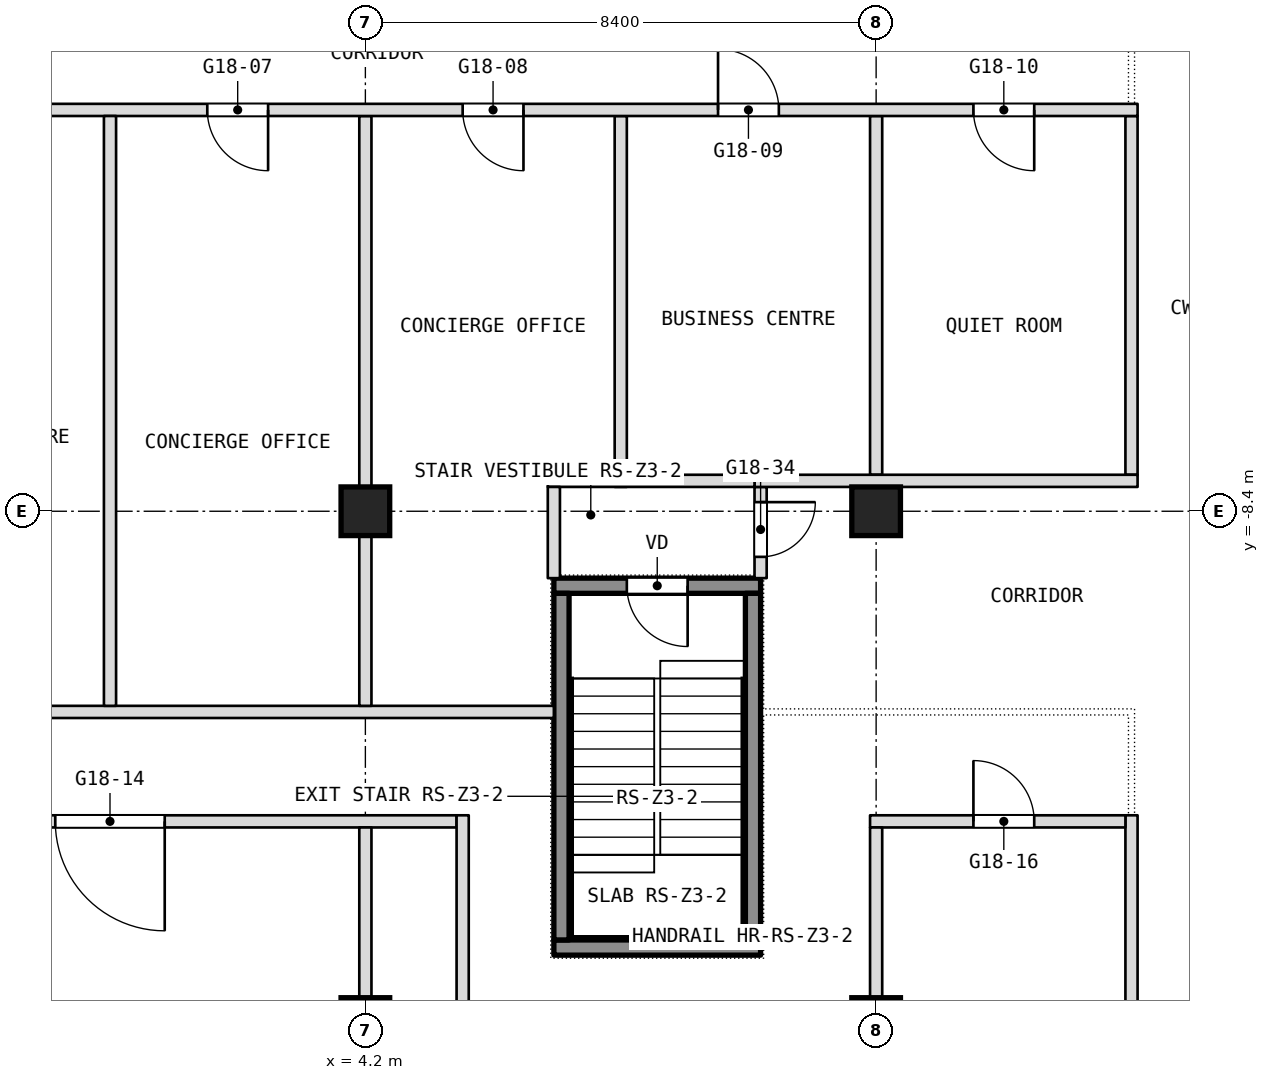
"""IFC4 building model, lengths in metres.
Left out: names, types, materials, properties, quantities, classifications, styles, units other than length and angle.
Written with IfcOpenShell. Run it as: python <this file> out.ifc"""

import sys

from ifc_helpers import new_model, si_unit, direction, frame, frame_2d, origin, origin_2d, place, context, subcontext, project, spatial, rectangle, extrude, element, fill, save


model = new_model("IFC4")
c1 = context("Model", 3, precision=1e-05, world=origin(), true_north=direction((0.0, 1.0)))
c2 = subcontext(c1, "Body", "Model", "MODEL_VIEW")
j1 = project(units=[si_unit("LENGTHUNIT", "METRE"), si_unit("PLANEANGLEUNIT", "RADIAN")], contexts=[c1])
p1 = place(None, origin())
s1 = spatial("IfcSite", under=j1, at=p1, CompositionType="ELEMENT")
p2 = place(p1, origin())
s2 = spatial("IfcBuilding", under=s1, at=p2, CompositionType="ELEMENT")
p3 = place(p2, frame((0.0, 0.0, 216.5)))
s3 = spatial("IfcBuildingStorey", under=s2, at=p3, CompositionType="ELEMENT", Elevation=216.5)
for number, where, z_axis, x_axis in (
    (1, (4.2, -16.8, 0.0), (0.0, 0.0, 1.0), (1.0, 0.0, 0.0)),
    (2, (4.2, -8.4, 0.0), (0.0, 0.0, 1.0), (1.0, 0.0, 0.0)),
    (3, (12.6, -16.8, 0.0), (0.0, 0.0, 1.0), (1.0, 0.0, 0.0)),
    (4, (12.6, -8.4, 0.0), (0.0, 0.0, 1.0), (1.0, 0.0, 0.0)),
):
    element("IfcColumn", number, at=place(p3, frame(where, z_axis=z_axis, x_axis=x_axis)), inside=s3, PredefinedType="COLUMN", context=c2, shape_type="SweptSolid", body=[
        extrude(rectangle(XDim=0.8, YDim=0.8, at=origin_2d()), origin(), (0.0, 0.0, 1.0), 3.6),
    ])
p4 = place(p3, frame((16.8, -20.2, 0.0), z_axis=(0.0, 0.0, 1.0), x_axis=(0.0, 1.0, 0.0)))
e5 = element("IfcWall", 5, at=p4, inside=s3, PredefinedType="PARTITIONING", context=c2, shape_type="SweptSolid", body=[
    extrude(rectangle(XDim=6.8, YDim=0.2, at=frame_2d((3.4, 0.0))), origin(), (0.0, 0.0, 1.0), 3.34),
])
p5 = place(p3, frame((16.8, -7.8, 0.0), z_axis=(0.0, 0.0, 1.0), x_axis=(0.0, 1.0, 0.0)))
e6 = element("IfcWall", 6, at=p5, inside=s3, PredefinedType="PARTITIONING", context=c2, shape_type="SweptSolid", body=[
    extrude(rectangle(XDim=5.9, YDim=0.2, at=frame_2d((2.95, 0.0))), origin(), (0.0, 0.0, 1.0), 3.34),
])
p6 = place(p3, frame((-5.9, -13.5, 0.0), z_axis=(0.0, 0.0, 1.0), x_axis=(1.0, 0.0, 0.0)))
e7 = element("IfcWall", 7, at=p6, inside=s3, PredefinedType="PARTITIONING", context=c2, shape_type="SweptSolid", body=[
    extrude(rectangle(XDim=11.6, YDim=0.2, at=frame_2d((5.8, 0.0))), origin(), (0.0, 0.0, 1.0), 3.34),
])
p7 = place(p6, frame((5.0, 0.0, 0.0)))
e8 = element("IfcOpeningElement", 8, at=p7, cuts=e7, PredefinedType="OPENING", context=c2, shape_type="SweptSolid", body=[
    extrude(rectangle(XDim=1.8, YDim=2.1, at=frame_2d((0.9, 1.05))), frame((0.0, 0.1, 0.0), z_axis=(0.0, -1.0, 0.0), x_axis=(1.0, 0.0, 0.0)), (0.0, 0.0, 1.0), 0.2),
])
p8 = place(p3, frame((12.5, -13.5, 0.0), z_axis=(0.0, 0.0, 1.0), x_axis=(1.0, 0.0, 0.0)))
e9 = element("IfcWall", 9, at=p8, inside=s3, PredefinedType="PARTITIONING", context=c2, shape_type="SweptSolid", body=[
    extrude(rectangle(XDim=4.2, YDim=0.2, at=frame_2d((2.1, 0.0))), origin(), (0.0, 0.0, 1.0), 3.34),
])
p9 = place(p8, frame((1.7, 0.0, 0.0)))
e10 = element("IfcOpeningElement", 10, at=p9, cuts=e9, PredefinedType="OPENING", context=c2, shape_type="SweptSolid", body=[
    extrude(rectangle(XDim=1.0, YDim=2.1, at=frame_2d((0.5, 1.05))), frame((0.0, 0.1, 0.0), z_axis=(0.0, -1.0, 0.0), x_axis=(1.0, 0.0, 0.0)), (0.0, 0.0, 1.0), 0.2),
])
p10 = place(p3, frame((12.6, -7.8, 0.0), z_axis=(0.0, 0.0, 1.0), x_axis=(0.0, 1.0, 0.0)))
e11 = element("IfcWall", 11, at=p10, inside=s3, PredefinedType="PARTITIONING", context=c2, shape_type="SweptSolid", body=[
    extrude(rectangle(XDim=5.9, YDim=0.2, at=frame_2d((2.95, 0.0))), origin(), (0.0, 0.0, 1.0), 3.34),
])
p11 = place(p3, frame((12.6, -18.3, 0.0), z_axis=(0.0, 0.0, 1.0), x_axis=(0.0, 1.0, 0.0)))
e12 = element("IfcWall", 12, at=p11, inside=s3, PredefinedType="PARTITIONING", context=c2, shape_type="SweptSolid", body=[
    extrude(rectangle(XDim=4.7, YDim=0.2, at=frame_2d((2.35, 0.0))), origin(), (0.0, 0.0, 1.0), 3.34),
])
p12 = place(p3, frame((-7.3, -11.7, 0.0), z_axis=(0.0, 0.0, 1.0), x_axis=(1.0, 0.0, 0.0)))
e13 = element("IfcWall", 13, at=p12, inside=s3, PredefinedType="PARTITIONING", context=c2, shape_type="SweptSolid", body=[
    extrude(rectangle(XDim=14.6, YDim=0.2, at=frame_2d((7.3, 0.0))), origin(), (0.0, 0.0, 1.0), 3.34),
])
p13 = place(p3, frame((10.7, -9.5, 0.0), z_axis=(0.0, 0.0, 1.0), x_axis=(0.0, 1.0, 0.0)))
e14 = element("IfcWall", 14, at=p13, inside=s3, PredefinedType="PARTITIONING", context=c2, shape_type="SweptSolid", body=[
    extrude(rectangle(XDim=1.5, YDim=0.2, at=frame_2d((0.75, 0.0))), origin(), (0.0, 0.0, 1.0), 3.34),
])
p14 = place(p13, frame((0.35, 0.0, 0.0)))
e15 = element("IfcOpeningElement", 15, at=p14, cuts=e14, PredefinedType="OPENING", context=c2, shape_type="SweptSolid", body=[
    extrude(rectangle(XDim=0.9, YDim=2.1, at=frame_2d((0.45, 1.05))), frame((0.0, 0.1, 0.0), z_axis=(0.0, -1.0, 0.0), x_axis=(1.0, 0.0, 0.0)), (0.0, 0.0, 1.0), 0.2),
])
p15 = place(p3, frame((8.4, -8.0, 0.0), z_axis=(0.0, 0.0, 1.0), x_axis=(0.0, 1.0, 0.0)))
e16 = element("IfcWall", 16, at=p15, inside=s3, PredefinedType="PARTITIONING", context=c2, shape_type="SweptSolid", body=[
    extrude(rectangle(XDim=6.1, YDim=0.2, at=frame_2d((3.05, 0.0))), origin(), (0.0, 0.0, 1.0), 3.34),
])
p16 = place(p3, frame((10.6, -7.9, 0.0), z_axis=(0.0, 0.0, 1.0), x_axis=(1.0, 0.0, 0.0)))
e17 = element("IfcWall", 17, at=p16, inside=s3, PredefinedType="PARTITIONING", context=c2, shape_type="SweptSolid", body=[
    extrude(rectangle(XDim=6.3, YDim=0.2, at=frame_2d((3.15, 0.0))), origin(), (0.0, 0.0, 1.0), 3.34),
])
p17 = place(p3, frame((7.2, -7.9, 0.0), z_axis=(0.0, 0.0, 1.0), x_axis=(1.0, 0.0, 0.0)))
e18 = element("IfcWall", 18, at=p17, inside=s3, PredefinedType="PARTITIONING", context=c2, shape_type="SweptSolid", body=[
    extrude(rectangle(XDim=3.4, YDim=0.2, at=frame_2d((1.7, 0.0))), origin(), (0.0, 0.0, 1.0), 3.34),
])
p18 = place(p3, frame((7.3, -9.5, 0.0), z_axis=(0.0, 0.0, 1.0), x_axis=(0.0, 1.0, 0.0)))
e19 = element("IfcWall", 19, at=p18, inside=s3, PredefinedType="PARTITIONING", context=c2, shape_type="SweptSolid", body=[
    extrude(rectangle(XDim=1.5, YDim=0.2, at=frame_2d((0.75, 0.0))), origin(), (0.0, 0.0, 1.0), 3.34),
])
p19 = place(p3, frame((5.8, -18.3, 0.0), z_axis=(0.0, 0.0, 1.0), x_axis=(0.0, 1.0, 0.0)))
e20 = element("IfcWall", 20, at=p19, inside=s3, PredefinedType="PARTITIONING", context=c2, shape_type="SweptSolid", body=[
    extrude(rectangle(XDim=4.9, YDim=0.2, at=frame_2d((2.45, 0.0))), origin(), (0.0, 0.0, 1.0), 3.34),
])
p20 = place(p3, frame((4.2, -20.0, 0.0), z_axis=(0.0, 0.0, 1.0), x_axis=(0.0, 1.0, 0.0)))
e21 = element("IfcWall", 21, at=p20, inside=s3, PredefinedType="PARTITIONING", context=c2, shape_type="SweptSolid", body=[
    extrude(rectangle(XDim=6.4, YDim=0.2, at=frame_2d((3.2, 0.0))), origin(), (0.0, 0.0, 1.0), 3.34),
])
p21 = place(p3, frame((4.2, -11.6, 0.0), z_axis=(0.0, 0.0, 1.0), x_axis=(0.0, 1.0, 0.0)))
e22 = element("IfcWall", 22, at=p21, inside=s3, PredefinedType="PARTITIONING", context=c2, shape_type="SweptSolid", body=[
    extrude(rectangle(XDim=9.7, YDim=0.2, at=frame_2d((4.85, 0.0))), origin(), (0.0, 0.0, 1.0), 3.34),
])
p22 = place(p3, frame((-16.9, -1.8, 0.0), z_axis=(0.0, 0.0, 1.0), x_axis=(1.0, 0.0, 0.0)))
e23 = element("IfcWall", 23, at=p22, inside=s3, PredefinedType="PARTITIONING", context=c2, shape_type="SweptSolid", body=[
    extrude(rectangle(XDim=33.8, YDim=0.2, at=frame_2d((16.9, 0.0))), origin(), (0.0, 0.0, 1.0), 3.34),
])
p23 = place(p22, frame((1.7, 0.0, 0.0)))
e24 = element("IfcOpeningElement", 24, at=p23, cuts=e23, PredefinedType="OPENING", context=c2, shape_type="SweptSolid", body=[
    extrude(rectangle(XDim=1.0, YDim=2.1, at=frame_2d((0.5, 1.05))), frame((0.0, 0.1, 0.0), z_axis=(0.0, -1.0, 0.0), x_axis=(1.0, 0.0, 0.0)), (0.0, 0.0, 1.0), 0.2),
])
p24 = place(p22, frame((5.9, 0.0, 0.0)))
e25 = element("IfcOpeningElement", 25, at=p24, cuts=e23, PredefinedType="OPENING", context=c2, shape_type="SweptSolid", body=[
    extrude(rectangle(XDim=1.0, YDim=2.1, at=frame_2d((0.5, 1.05))), frame((0.0, 0.1, 0.0), z_axis=(0.0, -1.0, 0.0), x_axis=(1.0, 0.0, 0.0)), (0.0, 0.0, 1.0), 0.2),
])
p25 = place(p22, frame((10.1, 0.0, 0.0)))
e26 = element("IfcOpeningElement", 26, at=p25, cuts=e23, PredefinedType="OPENING", context=c2, shape_type="SweptSolid", body=[
    extrude(rectangle(XDim=1.0, YDim=2.1, at=frame_2d((0.5, 1.05))), frame((0.0, 0.1, 0.0), z_axis=(0.0, -1.0, 0.0), x_axis=(1.0, 0.0, 0.0)), (0.0, 0.0, 1.0), 0.2),
])
p26 = place(p22, frame((14.3, 0.0, 0.0)))
e27 = element("IfcOpeningElement", 27, at=p26, cuts=e23, PredefinedType="OPENING", context=c2, shape_type="SweptSolid", body=[
    extrude(rectangle(XDim=1.0, YDim=2.1, at=frame_2d((0.5, 1.05))), frame((0.0, 0.1, 0.0), z_axis=(0.0, -1.0, 0.0), x_axis=(1.0, 0.0, 0.0)), (0.0, 0.0, 1.0), 0.2),
])
p27 = place(p22, frame((18.5, 0.0, 0.0)))
e28 = element("IfcOpeningElement", 28, at=p27, cuts=e23, PredefinedType="OPENING", context=c2, shape_type="SweptSolid", body=[
    extrude(rectangle(XDim=1.0, YDim=2.1, at=frame_2d((0.5, 1.05))), frame((0.0, 0.1, 0.0), z_axis=(0.0, -1.0, 0.0), x_axis=(1.0, 0.0, 0.0)), (0.0, 0.0, 1.0), 0.2),
])
p28 = place(p22, frame((22.7, 0.0, 0.0)))
e29 = element("IfcOpeningElement", 29, at=p28, cuts=e23, PredefinedType="OPENING", context=c2, shape_type="SweptSolid", body=[
    extrude(rectangle(XDim=1.0, YDim=2.1, at=frame_2d((0.5, 1.05))), frame((0.0, 0.1, 0.0), z_axis=(0.0, -1.0, 0.0), x_axis=(1.0, 0.0, 0.0)), (0.0, 0.0, 1.0), 0.2),
])
p29 = place(p22, frame((26.9, 0.0, 0.0)))
e30 = element("IfcOpeningElement", 30, at=p29, cuts=e23, PredefinedType="OPENING", context=c2, shape_type="SweptSolid", body=[
    extrude(rectangle(XDim=1.0, YDim=2.1, at=frame_2d((0.5, 1.05))), frame((0.0, 0.1, 0.0), z_axis=(0.0, -1.0, 0.0), x_axis=(1.0, 0.0, 0.0)), (0.0, 0.0, 1.0), 0.2),
])
p30 = place(p22, frame((31.1, 0.0, 0.0)))
e31 = element("IfcOpeningElement", 31, at=p30, cuts=e23, PredefinedType="OPENING", context=c2, shape_type="SweptSolid", body=[
    extrude(rectangle(XDim=1.0, YDim=2.1, at=frame_2d((0.5, 1.05))), frame((0.0, 0.1, 0.0), z_axis=(0.0, -1.0, 0.0), x_axis=(1.0, 0.0, 0.0)), (0.0, 0.0, 1.0), 0.2),
])
p31 = place(p3, frame((0.0, -11.6, 0.0), z_axis=(0.0, 0.0, 1.0), x_axis=(0.0, 1.0, 0.0)))
e32 = element("IfcWall", 32, at=p31, inside=s3, PredefinedType="PARTITIONING", context=c2, shape_type="SweptSolid", body=[
    extrude(rectangle(XDim=9.7, YDim=0.2, at=frame_2d((4.85, 0.0))), origin(), (0.0, 0.0, 1.0), 3.34),
])
p32 = place(p3, frame((7.3, -15.575, 0.1), z_axis=(0.0, 0.0, 1.0), x_axis=(1.0, 0.0, 0.0)))
e33 = element("IfcWall", 33, at=p32, inside=s3, PredefinedType="SHEAR", context=c2, shape_type="SweptSolid", body=[
    extrude(rectangle(XDim=3.4, YDim=0.25, at=frame_2d((1.7, 0.0))), origin(), (0.0, 0.0, 1.0), 3.6),
])
p33 = place(p3, frame((7.3, -9.625, 0.1), z_axis=(0.0, 0.0, 1.0), x_axis=(1.0, 0.0, 0.0)))
e34 = element("IfcWall", 34, at=p33, inside=s3, PredefinedType="SHEAR", context=c2, shape_type="SweptSolid", body=[
    extrude(rectangle(XDim=3.4, YDim=0.25, at=frame_2d((1.7, 0.0))), origin(), (0.0, 0.0, 1.0), 3.6),
])
p34 = place(p33, frame((1.2, 0.0, 0.0)))
e35 = element("IfcOpeningElement", 35, at=p34, cuts=e34, PredefinedType="OPENING", context=c2, shape_type="SweptSolid", body=[
    extrude(rectangle(XDim=1.0, YDim=2.1, at=frame_2d((0.5, 1.05))), frame((0.0, 0.125, 0.0), z_axis=(0.0, -1.0, 0.0), x_axis=(1.0, 0.0, 0.0)), (0.0, 0.0, 1.0), 0.25),
])
for number, where, z_axis, x_axis in (
    (36, (7.425, -15.45, 0.1), (0.0, 0.0, 1.0), (0.0, 1.0, 0.0)),
    (37, (10.575, -15.45, 0.1), (0.0, 0.0, 1.0), (0.0, 1.0, 0.0)),
):
    element("IfcWall", number, at=place(p3, frame(where, z_axis=z_axis, x_axis=x_axis)), inside=s3, PredefinedType="SHEAR", context=c2, shape_type="SweptSolid", body=[
        extrude(rectangle(XDim=5.7, YDim=0.25, at=frame_2d((2.85, 0.0))), origin(), (0.0, 0.0, 1.0), 3.6),
    ])
p35 = place(p7, origin())
e38 = element("IfcDoor", 38, at=p35, inside=s3, OperationType="DOUBLE_DOOR_SINGLE_SWING", PredefinedType="DOOR", context=c2, shape_type="SweptSolid", body=[
    extrude(rectangle(XDim=1.8, YDim=2.1, at=frame_2d((0.9, 1.05))), frame((0.0, 0.025, 0.0), z_axis=(0.0, -1.0, 0.0), x_axis=(1.0, 0.0, 0.0)), (0.0, 0.0, 1.0), 0.05),
])
fill(e8, e38)
p36 = place(p9, origin())
e39 = element("IfcDoor", 39, at=p36, inside=s3, OperationType="SINGLE_SWING_RIGHT", PredefinedType="DOOR", context=c2, shape_type="SweptSolid", body=[
    extrude(rectangle(XDim=1.0, YDim=2.1, at=frame_2d((0.5, 1.05))), frame((0.0, 0.025, 0.0), z_axis=(0.0, -1.0, 0.0), x_axis=(1.0, 0.0, 0.0)), (0.0, 0.0, 1.0), 0.05),
])
fill(e10, e39)
p37 = place(p14, origin())
e40 = element("IfcDoor", 40, at=p37, inside=s3, OperationType="SINGLE_SWING_RIGHT", PredefinedType="DOOR", context=c2, shape_type="SweptSolid", body=[
    extrude(rectangle(XDim=0.9, YDim=2.1, at=frame_2d((0.45, 1.05))), frame((0.0, 0.025, 0.0), z_axis=(0.0, -1.0, 0.0), x_axis=(1.0, 0.0, 0.0)), (0.0, 0.0, 1.0), 0.05),
])
fill(e15, e40)
p38 = place(p27, origin())
e41 = element("IfcDoor", 41, at=p38, inside=s3, OperationType="SINGLE_SWING_RIGHT", PredefinedType="DOOR", context=c2, shape_type="SweptSolid", body=[
    extrude(rectangle(XDim=1.0, YDim=2.1, at=frame_2d((0.5, 1.05))), frame((0.0, 0.025, 0.0), z_axis=(0.0, -1.0, 0.0), x_axis=(1.0, 0.0, 0.0)), (0.0, 0.0, 1.0), 0.05),
])
fill(e28, e41)
p39 = place(p28, origin())
e42 = element("IfcDoor", 42, at=p39, inside=s3, OperationType="SINGLE_SWING_LEFT", PredefinedType="DOOR", context=c2, shape_type="SweptSolid", body=[
    extrude(rectangle(XDim=1.0, YDim=2.1, at=frame_2d((0.5, 1.05))), frame((0.0, 0.025, 0.0), z_axis=(0.0, -1.0, 0.0), x_axis=(1.0, 0.0, 0.0)), (0.0, 0.0, 1.0), 0.05),
])
fill(e29, e42)
p40 = place(p29, origin())
e43 = element("IfcDoor", 43, at=p40, inside=s3, OperationType="SINGLE_SWING_RIGHT", PredefinedType="DOOR", context=c2, shape_type="SweptSolid", body=[
    extrude(rectangle(XDim=1.0, YDim=2.1, at=frame_2d((0.5, 1.05))), frame((0.0, 0.025, 0.0), z_axis=(0.0, -1.0, 0.0), x_axis=(1.0, 0.0, 0.0)), (0.0, 0.0, 1.0), 0.05),
])
fill(e30, e43)
p41 = place(p30, origin())
e44 = element("IfcDoor", 44, at=p41, inside=s3, OperationType="SINGLE_SWING_LEFT", PredefinedType="DOOR", context=c2, shape_type="SweptSolid", body=[
    extrude(rectangle(XDim=1.0, YDim=2.1, at=frame_2d((0.5, 1.05))), frame((0.0, 0.025, 0.0), z_axis=(0.0, -1.0, 0.0), x_axis=(1.0, 0.0, 0.0)), (0.0, 0.0, 1.0), 0.05),
])
fill(e31, e44)
p42 = place(p34, origin())
e45 = element("IfcDoor", 45, at=p42, inside=s3, OperationType="SINGLE_SWING_LEFT", PredefinedType="DOOR", context=c2, shape_type="SweptSolid", body=[
    extrude(rectangle(XDim=1.0, YDim=2.1, at=frame_2d((0.5, 1.05))), frame((0.0, 0.025, 0.0), z_axis=(0.0, -1.0, 0.0), x_axis=(1.0, 0.0, 0.0)), (0.0, 0.0, 1.0), 0.05),
])
fill(e35, e45)
save(model, sys.argv[1])
